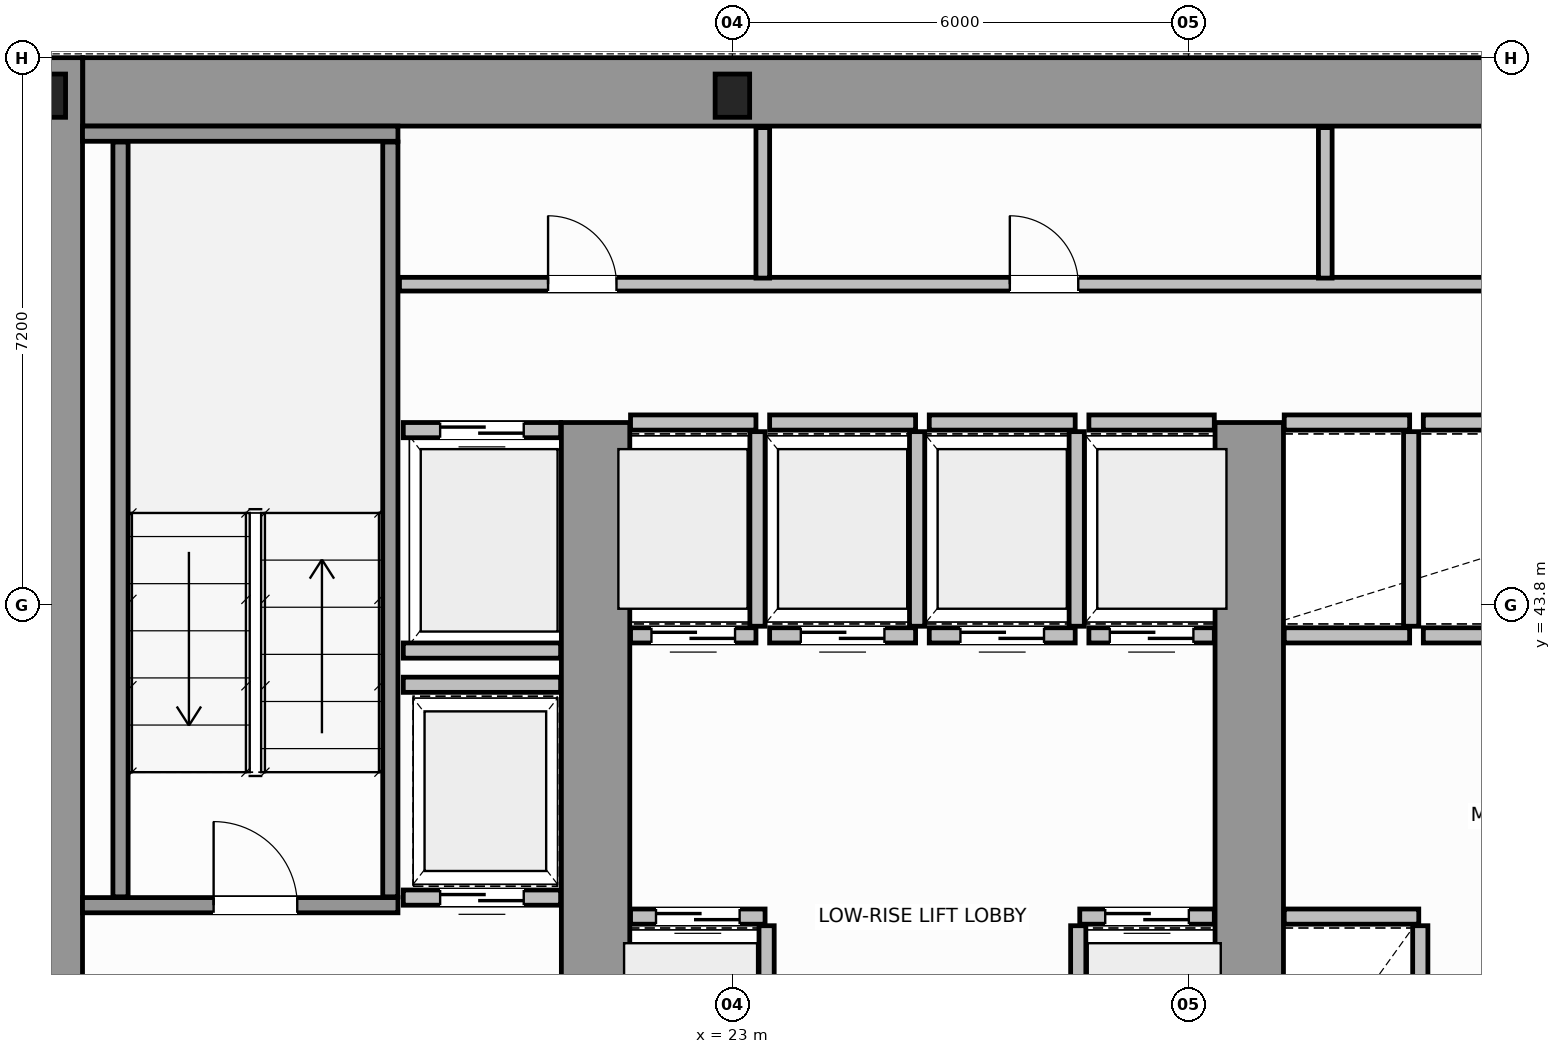
"""IFC4 building model, lengths in metres.
Left out: names, types, materials, properties, quantities, classifications, styles, units other than length and angle.
Written with IfcOpenShell. Run it as: python <this file> out.ifc"""

import sys

from ifc_helpers import new_model, si_unit, direction, frame, frame_2d, origin, origin_2d, place, context, subcontext, project, spatial, rectangle, i_section, extrude, source, transform, mapped, element, fill, save


model = new_model("IFC4")
c1 = context("Model", 3, precision=1e-05, world=origin(), true_north=direction((0.0, 1.0)))
c2 = subcontext(c1, "Body", "Model", "MODEL_VIEW")
j1 = project(units=[si_unit("LENGTHUNIT", "METRE"), si_unit("PLANEANGLEUNIT", "RADIAN")], contexts=[c1])
p1 = place(None, origin())
s1 = spatial("IfcSite", under=j1, at=p1, CompositionType="ELEMENT")
p2 = place(p1, origin())
s2 = spatial("IfcBuilding", under=s1, at=p2, CompositionType="ELEMENT")
p3 = place(p2, frame((0.0, 0.0, 53.0)))
s3 = spatial("IfcBuildingStorey", under=s2, at=p3, CompositionType="ELEMENT", Elevation=53.0)
m1 = source(origin(), c2, "Body", "SweptSolid", [
    extrude(i_section(OverallWidth=0.454, OverallDepth=0.569, WebThickness=0.078, FlangeThickness=0.08, FilletRadius=0.015, at=origin_2d()), origin(), (0.0, 0.0, 1.0), 3.8),
])
for number, where, z_axis, x_axis in (
    (1, (14.0, 50.5, 0.0), (0.0, 0.0, 1.0), (1.0, 0.0, 0.0)),
    (2, (23.0, 50.5, 0.0), (0.0, 0.0, 1.0), (1.0, 0.0, 0.0)),
):
    element("IfcColumn", number, at=place(p3, frame(where, z_axis=z_axis, x_axis=x_axis)), inside=s3, PredefinedType="COLUMN", context=c2, shape_type="MappedRepresentation", body=[
        mapped(m1, transform((0.0, 0.0, 0.0), scale=1.0)),
    ])
p4 = place(p3, frame((14.454, 50.55, 0.0), z_axis=(0.0, 0.0, 1.0), x_axis=(1.0, 0.0, 0.0)))
e3 = element("IfcWall", 3, at=p4, inside=s3, PredefinedType="SHEAR", context=c2, shape_type="SweptSolid", body=[
    extrude(rectangle(XDim=19.544, YDim=0.9, at=frame_2d((9.772, 0.0))), origin(), (0.0, 0.0, 1.0), 3.8),
])
p5 = place(p3, frame((14.0, 36.5, 0.0), z_axis=(0.0, 0.0, 1.0), x_axis=(0.0, 1.0, 0.0)))
e4 = element("IfcWall", 4, at=p5, inside=s3, PredefinedType="SHEAR", context=c2, shape_type="SweptSolid", body=[
    extrude(rectangle(XDim=14.5, YDim=0.9, at=frame_2d((7.25, 0.0))), origin(), (0.0, 0.0, 1.0), 3.8),
])
for number, where, z_axis, x_axis in (
    (5, (21.2, 36.97, 0.0), (0.0, 0.0, 1.0), (0.0, 1.0, 0.0)),
    (6, (29.8, 36.97, 0.0), (0.0, 0.0, 1.0), (0.0, 1.0, 0.0)),
):
    element("IfcWall", number, at=place(p3, frame(where, z_axis=z_axis, x_axis=x_axis)), inside=s3, PredefinedType="SHEAR", context=c2, shape_type="SweptSolid", body=[
        extrude(rectangle(XDim=9.23, YDim=0.9, at=frame_2d((4.615, 0.0))), origin(), (0.0, 0.0, 1.0), 3.8),
    ])
p6 = place(p3, frame((14.45, 39.85, 0.0), z_axis=(0.0, 0.0, 1.0), x_axis=(1.0, 0.0, 0.0)))
e7 = element("IfcWall", 7, at=p6, inside=s3, PredefinedType="SOLIDWALL", context=c2, shape_type="SweptSolid", body=[
    extrude(rectangle(XDim=4.15, YDim=0.2, at=frame_2d((2.075, 0.0))), origin(), (0.0, 0.0, 1.0), 3.8),
])
p7 = place(p6, frame((1.725, 0.0, 0.0)))
e8 = element("IfcOpeningElement", 8, at=p7, cuts=e7, PredefinedType="OPENING", context=c2, shape_type="SweptSolid", body=[
    extrude(rectangle(XDim=1.1, YDim=2.15, at=frame_2d((0.55, 1.075))), frame((0.0, 0.11, 0.0), z_axis=(0.0, -1.0, 0.0), x_axis=(1.0, 0.0, 0.0)), (0.0, 0.0, 1.0), 0.22),
])
p8 = place(p3, frame((14.45, 50.0, 0.0), z_axis=(0.0, 0.0, 1.0), x_axis=(1.0, 0.0, 0.0)))
e9 = element("IfcWall", 9, at=p8, inside=s3, PredefinedType="SOLIDWALL", context=c2, shape_type="SweptSolid", body=[
    extrude(rectangle(XDim=4.15, YDim=0.2, at=frame_2d((2.075, 0.0))), origin(), (0.0, 0.0, 1.0), 3.8),
])
for number, where, z_axis, x_axis in (
    (10, (14.95, 39.96, 0.0), (0.0, 0.0, 1.0), (0.0, 1.0, 0.0)),
    (11, (18.5, 39.96, 0.0), (0.0, 0.0, 1.0), (0.0, 1.0, 0.0)),
):
    element("IfcWall", number, at=place(p3, frame(where, z_axis=z_axis, x_axis=x_axis)), inside=s3, PredefinedType="SOLIDWALL", context=c2, shape_type="SweptSolid", body=[
        extrude(rectangle(XDim=9.93, YDim=0.2, at=frame_2d((4.965, 0.0))), origin(), (0.0, 0.0, 1.0), 3.8),
    ])
p9 = place(p3, frame((21.66, 39.7, 0.0), z_axis=(0.0, 0.0, 1.0), x_axis=(1.0, 0.0, 0.0)))
e12 = element("IfcWall", 12, at=p9, inside=s3, PredefinedType="SOLIDWALL", context=c2, shape_type="SweptSolid", body=[
    extrude(rectangle(XDim=1.77, YDim=0.2, at=frame_2d((0.885, 0.0))), origin(), (0.0, 0.0, 1.0), 3.58),
])
p10 = place(p9, frame((0.335, 0.0, 0.0)))
e13 = element("IfcOpeningElement", 13, at=p10, cuts=e12, PredefinedType="OPENING", context=c2, shape_type="SweptSolid", body=[
    extrude(rectangle(XDim=1.1, YDim=2.15, at=frame_2d((0.55, 1.075))), frame((0.0, 0.11, 0.0), z_axis=(0.0, -1.0, 0.0), x_axis=(1.0, 0.0, 0.0)), (0.0, 0.0, 1.0), 0.22),
])
p11 = place(p3, frame((23.45, 37.02, 0.0), z_axis=(0.0, 0.0, 1.0), x_axis=(0.0, 1.0, 0.0)))
e14 = element("IfcWall", 14, at=p11, inside=s3, PredefinedType="SOLIDWALL", context=c2, shape_type="SweptSolid", body=[
    extrude(rectangle(XDim=2.56, YDim=0.2, at=frame_2d((1.28, 0.0))), origin(), (0.0, 0.0, 1.0), 3.58),
])
p12 = place(p3, frame((27.57, 39.7, 0.0), z_axis=(0.0, 0.0, 1.0), x_axis=(1.0, 0.0, 0.0)))
e15 = element("IfcWall", 15, at=p12, inside=s3, PredefinedType="SOLIDWALL", context=c2, shape_type="SweptSolid", body=[
    extrude(rectangle(XDim=1.77, YDim=0.2, at=frame_2d((0.885, 0.0))), origin(), (0.0, 0.0, 1.0), 3.58),
])
p13 = place(p12, frame((0.335, 0.0, 0.0)))
e16 = element("IfcOpeningElement", 16, at=p13, cuts=e15, PredefinedType="OPENING", context=c2, shape_type="SweptSolid", body=[
    extrude(rectangle(XDim=1.1, YDim=2.15, at=frame_2d((0.55, 1.075))), frame((0.0, 0.11, 0.0), z_axis=(0.0, -1.0, 0.0), x_axis=(1.0, 0.0, 0.0)), (0.0, 0.0, 1.0), 0.22),
])
p14 = place(p3, frame((27.55, 37.02, 0.0), z_axis=(0.0, 0.0, 1.0), x_axis=(0.0, 1.0, 0.0)))
e17 = element("IfcWall", 17, at=p14, inside=s3, PredefinedType="SOLIDWALL", context=c2, shape_type="SweptSolid", body=[
    extrude(rectangle(XDim=2.56, YDim=0.2, at=frame_2d((1.28, 0.0))), origin(), (0.0, 0.0, 1.0), 3.58),
])
p15 = place(p3, frame((21.66, 43.4, 0.0), z_axis=(0.0, 0.0, 1.0), x_axis=(1.0, 0.0, 0.0)))
e18 = element("IfcWall", 18, at=p15, inside=s3, PredefinedType="SOLIDWALL", context=c2, shape_type="SweptSolid", body=[
    extrude(rectangle(XDim=1.65, YDim=0.2, at=frame_2d((0.825, 0.0))), origin(), (0.0, 0.0, 1.0), 3.58),
])
p16 = place(p15, frame((0.275, 0.0, 0.0)))
e19 = element("IfcOpeningElement", 19, at=p16, cuts=e18, PredefinedType="OPENING", context=c2, shape_type="SweptSolid", body=[
    extrude(rectangle(XDim=1.1, YDim=2.15, at=frame_2d((0.55, 1.075))), frame((0.0, 0.11, 0.0), z_axis=(0.0, -1.0, 0.0), x_axis=(1.0, 0.0, 0.0)), (0.0, 0.0, 1.0), 0.22),
])
p17 = place(p3, frame((21.66, 46.2, 0.0), z_axis=(0.0, 0.0, 1.0), x_axis=(1.0, 0.0, 0.0)))
e20 = element("IfcWall", 20, at=p17, inside=s3, PredefinedType="SOLIDWALL", context=c2, shape_type="SweptSolid", body=[
    extrude(rectangle(XDim=1.65, YDim=0.2, at=frame_2d((0.825, 0.0))), origin(), (0.0, 0.0, 1.0), 3.58),
])
p18 = place(p3, frame((23.33, 43.52, 0.0), z_axis=(0.0, 0.0, 1.0), x_axis=(0.0, 1.0, 0.0)))
e21 = element("IfcWall", 21, at=p18, inside=s3, PredefinedType="SOLIDWALL", context=c2, shape_type="SweptSolid", body=[
    extrude(rectangle(XDim=2.56, YDim=0.2, at=frame_2d((1.28, 0.0))), origin(), (0.0, 0.0, 1.0), 3.58),
])
p19 = place(p3, frame((23.49, 43.4, 0.0), z_axis=(0.0, 0.0, 1.0), x_axis=(1.0, 0.0, 0.0)))
e22 = element("IfcWall", 22, at=p19, inside=s3, PredefinedType="SOLIDWALL", context=c2, shape_type="SweptSolid", body=[
    extrude(rectangle(XDim=1.92, YDim=0.2, at=frame_2d((0.96, 0.0))), origin(), (0.0, 0.0, 1.0), 3.58),
])
p20 = place(p19, frame((0.41, 0.0, 0.0)))
e23 = element("IfcOpeningElement", 23, at=p20, cuts=e22, PredefinedType="OPENING", context=c2, shape_type="SweptSolid", body=[
    extrude(rectangle(XDim=1.1, YDim=2.15, at=frame_2d((0.55, 1.075))), frame((0.0, 0.11, 0.0), z_axis=(0.0, -1.0, 0.0), x_axis=(1.0, 0.0, 0.0)), (0.0, 0.0, 1.0), 0.22),
])
p21 = place(p3, frame((23.49, 46.2, 0.0), z_axis=(0.0, 0.0, 1.0), x_axis=(1.0, 0.0, 0.0)))
e24 = element("IfcWall", 24, at=p21, inside=s3, PredefinedType="SOLIDWALL", context=c2, shape_type="SweptSolid", body=[
    extrude(rectangle(XDim=1.92, YDim=0.2, at=frame_2d((0.96, 0.0))), origin(), (0.0, 0.0, 1.0), 3.58),
])
p22 = place(p3, frame((25.43, 43.52, 0.0), z_axis=(0.0, 0.0, 1.0), x_axis=(0.0, 1.0, 0.0)))
e25 = element("IfcWall", 25, at=p22, inside=s3, PredefinedType="SOLIDWALL", context=c2, shape_type="SweptSolid", body=[
    extrude(rectangle(XDim=2.56, YDim=0.2, at=frame_2d((1.28, 0.0))), origin(), (0.0, 0.0, 1.0), 3.58),
])
p23 = place(p3, frame((25.59, 43.4, 0.0), z_axis=(0.0, 0.0, 1.0), x_axis=(1.0, 0.0, 0.0)))
e26 = element("IfcWall", 26, at=p23, inside=s3, PredefinedType="SOLIDWALL", context=c2, shape_type="SweptSolid", body=[
    extrude(rectangle(XDim=1.92, YDim=0.2, at=frame_2d((0.96, 0.0))), origin(), (0.0, 0.0, 1.0), 3.58),
])
p24 = place(p23, frame((0.41, 0.0, 0.0)))
e27 = element("IfcOpeningElement", 27, at=p24, cuts=e26, PredefinedType="OPENING", context=c2, shape_type="SweptSolid", body=[
    extrude(rectangle(XDim=1.1, YDim=2.15, at=frame_2d((0.55, 1.075))), frame((0.0, 0.11, 0.0), z_axis=(0.0, -1.0, 0.0), x_axis=(1.0, 0.0, 0.0)), (0.0, 0.0, 1.0), 0.22),
])
p25 = place(p3, frame((25.59, 46.2, 0.0), z_axis=(0.0, 0.0, 1.0), x_axis=(1.0, 0.0, 0.0)))
e28 = element("IfcWall", 28, at=p25, inside=s3, PredefinedType="SOLIDWALL", context=c2, shape_type="SweptSolid", body=[
    extrude(rectangle(XDim=1.92, YDim=0.2, at=frame_2d((0.96, 0.0))), origin(), (0.0, 0.0, 1.0), 3.58),
])
p26 = place(p3, frame((27.53, 43.52, 0.0), z_axis=(0.0, 0.0, 1.0), x_axis=(0.0, 1.0, 0.0)))
e29 = element("IfcWall", 29, at=p26, inside=s3, PredefinedType="SOLIDWALL", context=c2, shape_type="SweptSolid", body=[
    extrude(rectangle(XDim=2.56, YDim=0.2, at=frame_2d((1.28, 0.0))), origin(), (0.0, 0.0, 1.0), 3.58),
])
p27 = place(p3, frame((27.69, 43.4, 0.0), z_axis=(0.0, 0.0, 1.0), x_axis=(1.0, 0.0, 0.0)))
e30 = element("IfcWall", 30, at=p27, inside=s3, PredefinedType="SOLIDWALL", context=c2, shape_type="SweptSolid", body=[
    extrude(rectangle(XDim=1.65, YDim=0.2, at=frame_2d((0.825, 0.0))), origin(), (0.0, 0.0, 1.0), 3.58),
])
p28 = place(p27, frame((0.275, 0.0, 0.0)))
e31 = element("IfcOpeningElement", 31, at=p28, cuts=e30, PredefinedType="OPENING", context=c2, shape_type="SweptSolid", body=[
    extrude(rectangle(XDim=1.1, YDim=2.15, at=frame_2d((0.55, 1.075))), frame((0.0, 0.11, 0.0), z_axis=(0.0, -1.0, 0.0), x_axis=(1.0, 0.0, 0.0)), (0.0, 0.0, 1.0), 0.22),
])
p29 = place(p3, frame((27.69, 46.2, 0.0), z_axis=(0.0, 0.0, 1.0), x_axis=(1.0, 0.0, 0.0)))
e32 = element("IfcWall", 32, at=p29, inside=s3, PredefinedType="SOLIDWALL", context=c2, shape_type="SweptSolid", body=[
    extrude(rectangle(XDim=1.65, YDim=0.2, at=frame_2d((0.825, 0.0))), origin(), (0.0, 0.0, 1.0), 3.58),
])
p30 = place(p3, frame((30.26, 39.7, 0.0), z_axis=(0.0, 0.0, 1.0), x_axis=(1.0, 0.0, 0.0)))
e33 = element("IfcWall", 33, at=p30, inside=s3, PredefinedType="SOLIDWALL", context=c2, shape_type="SweptSolid", body=[
    extrude(rectangle(XDim=1.77, YDim=0.2, at=frame_2d((0.885, 0.0))), origin(), (0.0, 0.0, 1.0), 3.58),
])
p31 = place(p3, frame((32.05, 37.02, 0.0), z_axis=(0.0, 0.0, 1.0), x_axis=(0.0, 1.0, 0.0)))
e34 = element("IfcWall", 34, at=p31, inside=s3, PredefinedType="SOLIDWALL", context=c2, shape_type="SweptSolid", body=[
    extrude(rectangle(XDim=2.56, YDim=0.2, at=frame_2d((1.28, 0.0))), origin(), (0.0, 0.0, 1.0), 3.58),
])
for number, where, z_axis, x_axis in (
    (35, (30.26, 43.4, 0.0), (0.0, 0.0, 1.0), (1.0, 0.0, 0.0)),
    (36, (30.26, 46.2, 0.0), (0.0, 0.0, 1.0), (1.0, 0.0, 0.0)),
):
    element("IfcWall", number, at=place(p3, frame(where, z_axis=z_axis, x_axis=x_axis)), inside=s3, PredefinedType="SOLIDWALL", context=c2, shape_type="SweptSolid", body=[
        extrude(rectangle(XDim=1.65, YDim=0.2, at=frame_2d((0.825, 0.0))), origin(), (0.0, 0.0, 1.0), 3.58),
    ])
p32 = place(p3, frame((31.93, 43.52, 0.0), z_axis=(0.0, 0.0, 1.0), x_axis=(0.0, 1.0, 0.0)))
e37 = element("IfcWall", 37, at=p32, inside=s3, PredefinedType="SOLIDWALL", context=c2, shape_type="SweptSolid", body=[
    extrude(rectangle(XDim=2.56, YDim=0.2, at=frame_2d((1.28, 0.0))), origin(), (0.0, 0.0, 1.0), 3.58),
])
for number, where, z_axis, x_axis in (
    (38, (32.09, 43.4, 0.0), (0.0, 0.0, 1.0), (1.0, 0.0, 0.0)),
    (39, (32.09, 46.2, 0.0), (0.0, 0.0, 1.0), (1.0, 0.0, 0.0)),
):
    element("IfcWall", number, at=place(p3, frame(where, z_axis=z_axis, x_axis=x_axis)), inside=s3, PredefinedType="SOLIDWALL", context=c2, shape_type="SweptSolid", body=[
        extrude(rectangle(XDim=1.92, YDim=0.2, at=frame_2d((0.96, 0.0))), origin(), (0.0, 0.0, 1.0), 3.58),
    ])
p33 = place(p3, frame((18.67, 46.1, 0.0), z_axis=(0.0, 0.0, 1.0), x_axis=(1.0, 0.0, 0.0)))
e40 = element("IfcWall", 40, at=p33, inside=s3, PredefinedType="SOLIDWALL", context=c2, shape_type="SweptSolid", body=[
    extrude(rectangle(XDim=2.07, YDim=0.2, at=frame_2d((1.035, 0.0))), origin(), (0.0, 0.0, 1.0), 3.58),
])
p34 = place(p33, frame((0.485, 0.0, 0.0)))
e41 = element("IfcOpeningElement", 41, at=p34, cuts=e40, PredefinedType="OPENING", context=c2, shape_type="SweptSolid", body=[
    extrude(rectangle(XDim=1.1, YDim=2.15, at=frame_2d((0.55, 1.075))), frame((0.0, 0.11, 0.0), z_axis=(0.0, -1.0, 0.0), x_axis=(1.0, 0.0, 0.0)), (0.0, 0.0, 1.0), 0.22),
])
p35 = place(p3, frame((18.67, 43.2, 0.0), z_axis=(0.0, 0.0, 1.0), x_axis=(1.0, 0.0, 0.0)))
e42 = element("IfcWall", 42, at=p35, inside=s3, PredefinedType="SOLIDWALL", context=c2, shape_type="SweptSolid", body=[
    extrude(rectangle(XDim=2.07, YDim=0.2, at=frame_2d((1.035, 0.0))), origin(), (0.0, 0.0, 1.0), 3.58),
])
p36 = place(p3, frame((18.67, 39.95, 0.0), z_axis=(0.0, 0.0, 1.0), x_axis=(1.0, 0.0, 0.0)))
e43 = element("IfcWall", 43, at=p36, inside=s3, PredefinedType="SOLIDWALL", context=c2, shape_type="SweptSolid", body=[
    extrude(rectangle(XDim=2.07, YDim=0.2, at=frame_2d((1.035, 0.0))), origin(), (0.0, 0.0, 1.0), 3.58),
])
p37 = place(p36, frame((0.485, 0.0, 0.0)))
e44 = element("IfcOpeningElement", 44, at=p37, cuts=e43, PredefinedType="OPENING", context=c2, shape_type="SweptSolid", body=[
    extrude(rectangle(XDim=1.1, YDim=2.15, at=frame_2d((0.55, 1.075))), frame((0.0, 0.11, 0.0), z_axis=(0.0, -1.0, 0.0), x_axis=(1.0, 0.0, 0.0)), (0.0, 0.0, 1.0), 0.22),
])
p38 = place(p3, frame((18.67, 42.75, 0.0), z_axis=(0.0, 0.0, 1.0), x_axis=(1.0, 0.0, 0.0)))
e45 = element("IfcWall", 45, at=p38, inside=s3, PredefinedType="SOLIDWALL", context=c2, shape_type="SweptSolid", body=[
    extrude(rectangle(XDim=2.07, YDim=0.2, at=frame_2d((1.035, 0.0))), origin(), (0.0, 0.0, 1.0), 3.58),
])
p39 = place(p3, frame((18.62, 48.02, 0.0), z_axis=(0.0, 0.0, 1.0), x_axis=(1.0, 0.0, 0.0)))
e46 = element("IfcWall", 46, at=p39, inside=s3, PredefinedType="PLUMBINGWALL", context=c2, shape_type="SweptSolid", body=[
    extrude(rectangle(XDim=30.76, YDim=0.18, at=frame_2d((15.38, 0.0))), origin(), (0.0, 0.0, 1.0), 3.58),
])
p40 = place(p39, frame((1.955, 0.0, 0.0)))
e47 = element("IfcOpeningElement", 47, at=p40, cuts=e46, PredefinedType="OPENING", context=c2, shape_type="SweptSolid", body=[
    extrude(rectangle(XDim=0.9, YDim=2.15, at=frame_2d((0.45, 1.075))), frame((0.0, 0.1, 0.0), z_axis=(0.0, -1.0, 0.0), x_axis=(1.0, 0.0, 0.0)), (0.0, 0.0, 1.0), 0.2),
])
p41 = place(p39, frame((8.03, 0.0, 0.0)))
e48 = element("IfcOpeningElement", 48, at=p41, cuts=e46, PredefinedType="OPENING", context=c2, shape_type="SweptSolid", body=[
    extrude(rectangle(XDim=0.9, YDim=2.15, at=frame_2d((0.45, 1.075))), frame((0.0, 0.1, 0.0), z_axis=(0.0, -1.0, 0.0), x_axis=(1.0, 0.0, 0.0)), (0.0, 0.0, 1.0), 0.2),
])
p42 = place(p39, frame((16.93, 0.0, 0.0)))
e49 = element("IfcOpeningElement", 49, at=p42, cuts=e46, PredefinedType="OPENING", context=c2, shape_type="SweptSolid", body=[
    extrude(rectangle(XDim=0.9, YDim=2.15, at=frame_2d((0.45, 1.075))), frame((0.0, 0.1, 0.0), z_axis=(0.0, -1.0, 0.0), x_axis=(1.0, 0.0, 0.0)), (0.0, 0.0, 1.0), 0.2),
])
p43 = place(p39, frame((26.205, 0.0, 0.0)))
e50 = element("IfcOpeningElement", 50, at=p43, cuts=e46, PredefinedType="OPENING", context=c2, shape_type="SweptSolid", body=[
    extrude(rectangle(XDim=0.9, YDim=2.15, at=frame_2d((0.45, 1.075))), frame((0.0, 0.1, 0.0), z_axis=(0.0, -1.0, 0.0), x_axis=(1.0, 0.0, 0.0)), (0.0, 0.0, 1.0), 0.2),
])
for number, where, z_axis, x_axis in (
    (51, (23.4, 48.1, 0.0), (0.0, 0.0, 1.0), (0.0, 1.0, 0.0)),
    (52, (30.8, 48.1, 0.0), (0.0, 0.0, 1.0), (0.0, 1.0, 0.0)),
):
    element("IfcWall", number, at=place(p3, frame(where, z_axis=z_axis, x_axis=x_axis)), inside=s3, PredefinedType="PLUMBINGWALL", context=c2, shape_type="SweptSolid", body=[
        extrude(rectangle(XDim=1.98, YDim=0.18, at=frame_2d((0.99, 0.0))), origin(), (0.0, 0.0, 1.0), 3.58),
    ])
m2 = source(origin(), c2, "Body", "SweptSolid", [
    extrude(rectangle(XDim=1.1, YDim=2.15, at=frame_2d((0.55, 1.075))), frame((0.0, 0.025, 0.0), z_axis=(0.0, -1.0, 0.0), x_axis=(1.0, 0.0, 0.0)), (0.0, 0.0, 1.0), 0.05),
])
p44 = place(p7, origin())
e53 = element("IfcDoor", 53, at=p44, inside=s3, OperationType="SINGLE_SWING_LEFT", PredefinedType="DOOR", context=c2, shape_type="MappedRepresentation", body=[
    mapped(m2, transform((0.0, 0.0, 0.0), scale=1.0)),
])
fill(e8, e53)
p45 = place(p10, origin())
e54 = element("IfcDoor", 54, at=p45, inside=s3, OperationType="DOUBLE_DOOR_SLIDING", PredefinedType="DOOR", context=c2, shape_type="MappedRepresentation", body=[
    mapped(m2, transform((0.0, 0.0, 0.0), scale=1.0)),
])
fill(e13, e54)
p46 = place(p13, origin())
e55 = element("IfcDoor", 55, at=p46, inside=s3, OperationType="DOUBLE_DOOR_SLIDING", PredefinedType="DOOR", context=c2, shape_type="MappedRepresentation", body=[
    mapped(m2, transform((0.0, 0.0, 0.0), scale=1.0)),
])
fill(e16, e55)
p47 = place(p16, origin())
e56 = element("IfcDoor", 56, at=p47, inside=s3, OperationType="DOUBLE_DOOR_SLIDING", PredefinedType="DOOR", context=c2, shape_type="MappedRepresentation", body=[
    mapped(m2, transform((0.0, 0.0, 0.0), scale=1.0)),
])
fill(e19, e56)
p48 = place(p20, origin())
e57 = element("IfcDoor", 57, at=p48, inside=s3, OperationType="DOUBLE_DOOR_SLIDING", PredefinedType="DOOR", context=c2, shape_type="MappedRepresentation", body=[
    mapped(m2, transform((0.0, 0.0, 0.0), scale=1.0)),
])
fill(e23, e57)
p49 = place(p24, origin())
e58 = element("IfcDoor", 58, at=p49, inside=s3, OperationType="DOUBLE_DOOR_SLIDING", PredefinedType="DOOR", context=c2, shape_type="MappedRepresentation", body=[
    mapped(m2, transform((0.0, 0.0, 0.0), scale=1.0)),
])
fill(e27, e58)
p50 = place(p28, origin())
e59 = element("IfcDoor", 59, at=p50, inside=s3, OperationType="DOUBLE_DOOR_SLIDING", PredefinedType="DOOR", context=c2, shape_type="MappedRepresentation", body=[
    mapped(m2, transform((0.0, 0.0, 0.0), scale=1.0)),
])
fill(e31, e59)
p51 = place(p34, origin())
e60 = element("IfcDoor", 60, at=p51, inside=s3, OperationType="DOUBLE_DOOR_SLIDING", PredefinedType="DOOR", context=c2, shape_type="MappedRepresentation", body=[
    mapped(m2, transform((0.0, 0.0, 0.0), scale=1.0)),
])
fill(e41, e60)
p52 = place(p37, origin())
e61 = element("IfcDoor", 61, at=p52, inside=s3, OperationType="DOUBLE_DOOR_SLIDING", PredefinedType="DOOR", context=c2, shape_type="MappedRepresentation", body=[
    mapped(m2, transform((0.0, 0.0, 0.0), scale=1.0)),
])
fill(e44, e61)
m3 = source(origin(), c2, "Body", "SweptSolid", [
    extrude(rectangle(XDim=0.9, YDim=2.15, at=frame_2d((0.45, 1.075))), frame((0.0, 0.025, 0.0), z_axis=(0.0, -1.0, 0.0), x_axis=(1.0, 0.0, 0.0)), (0.0, 0.0, 1.0), 0.05),
])
p53 = place(p40, origin())
e62 = element("IfcDoor", 62, at=p53, inside=s3, OperationType="SINGLE_SWING_LEFT", PredefinedType="DOOR", context=c2, shape_type="MappedRepresentation", body=[
    mapped(m3, transform((0.0, 0.0, 0.0), scale=1.0)),
])
fill(e47, e62)
p54 = place(p41, origin())
e63 = element("IfcDoor", 63, at=p54, inside=s3, OperationType="SINGLE_SWING_RIGHT", PredefinedType="DOOR", context=c2, shape_type="MappedRepresentation", body=[
    mapped(m3, transform((0.0, 0.0, 0.0), scale=1.0)),
])
fill(e48, e63)
save(model, sys.argv[1])
